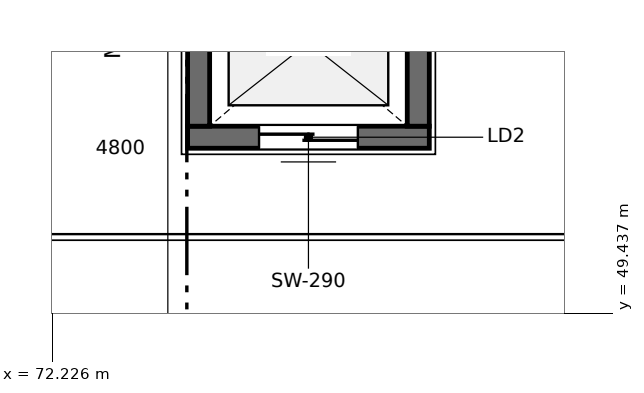
"""IFC4 building model, lengths in metres.
Left out: names, types, materials, properties, quantities, classifications, styles, units other than length and angle.
Written with IfcOpenShell. Run it as: python <this file> out.ifc"""

import sys

from ifc_helpers import new_model, si_unit, direction, frame, frame_2d, origin, place, context, subcontext, project, spatial, rectangle, extrude, element, fill, save


model = new_model("IFC4")
c1 = context("Model", 3, precision=1e-05, world=origin(), true_north=direction((0.0, 1.0)))
c2 = subcontext(c1, "Body", "Model", "MODEL_VIEW")
j1 = project(units=[si_unit("LENGTHUNIT", "METRE"), si_unit("PLANEANGLEUNIT", "RADIAN")], contexts=[c1])
p1 = place(None, origin())
s1 = spatial("IfcSite", under=j1, at=p1, CompositionType="ELEMENT")
p2 = place(p1, origin())
s2 = spatial("IfcBuilding", under=s1, at=p2, CompositionType="ELEMENT")
p3 = place(p2, frame((0.0, 0.0, 5.4)))
s3 = spatial("IfcBuildingStorey", under=s2, at=p3, CompositionType="ELEMENT", Elevation=5.4)
p4 = place(p3, frame((77.19, 51.755, 0.0), z_axis=(0.0, 0.0, 1.0), x_axis=(-1.0, 0.0, 0.0)))
e1 = element("IfcWall", 1, at=p4, inside=s3, PredefinedType="SHEAR", context=c2, shape_type="SweptSolid", body=[
    extrude(rectangle(XDim=3.18, YDim=0.29, at=frame_2d((1.59, 0.0))), origin(), (0.0, 0.0, 1.0), 2.65),
])
p5 = place(p4, frame((0.94, 0.0, 0.0)))
e2 = element("IfcOpeningElement", 2, at=p5, cuts=e1, PredefinedType="OPENING", context=c2, shape_type="SweptSolid", body=[
    extrude(rectangle(XDim=1.3, YDim=2.2, at=frame_2d((0.65, 1.1))), frame((0.0, 0.155, 0.0), z_axis=(0.0, -1.0, 0.0), x_axis=(1.0, 0.0, 0.0)), (0.0, 0.0, 1.0), 0.31),
])
for number, where, z_axis, x_axis in (
    (3, (74.155, 51.9, 0.0), (0.0, 0.0, 1.0), (0.0, 1.0, 0.0)),
    (4, (77.045, 54.1, 0.0), (0.0, 0.0, 1.0), (0.0, -1.0, 0.0)),
):
    element("IfcWall", number, at=place(p3, frame(where, z_axis=z_axis, x_axis=x_axis)), inside=s3, PredefinedType="SHEAR", context=c2, shape_type="SweptSolid", body=[
        extrude(rectangle(XDim=2.2, YDim=0.29, at=frame_2d((1.1, 0.0))), origin(), (0.0, 0.0, 1.0), 2.65),
    ])
p6 = place(p5, origin())
e5 = element("IfcDoor", 5, at=p6, inside=s3, OperationType="DOUBLE_DOOR_SLIDING", PredefinedType="DOOR", context=c2, shape_type="SweptSolid", body=[
    extrude(rectangle(XDim=1.3, YDim=2.2, at=frame_2d((0.65, 1.1))), frame((0.0, 0.025, 0.0), z_axis=(0.0, -1.0, 0.0), x_axis=(1.0, 0.0, 0.0)), (0.0, 0.0, 1.0), 0.05),
])
fill(e2, e5)
save(model, sys.argv[1])
